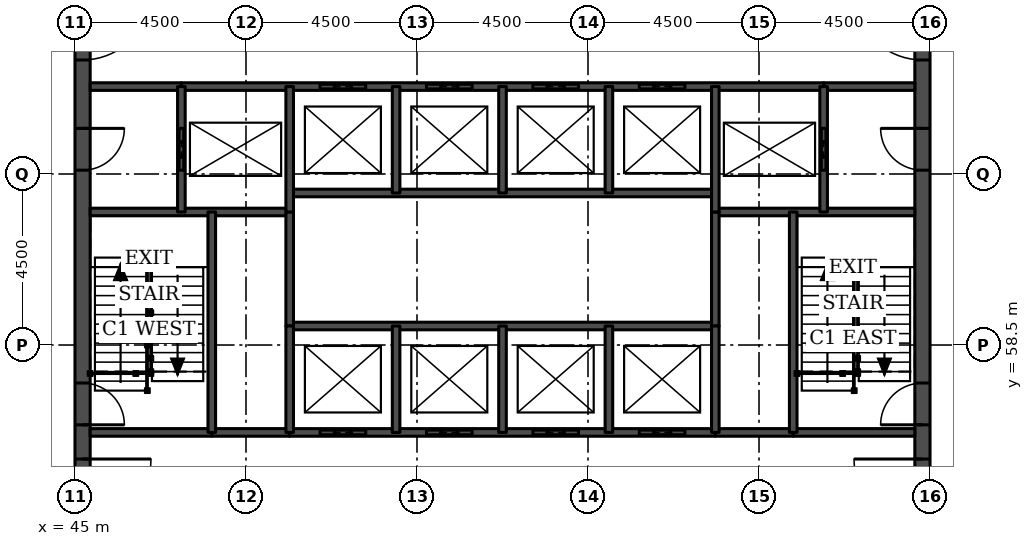
"""IFC4 building model, lengths in metres.
Left out: names, types, materials, properties, quantities, classifications, styles, units other than length and angle.
Written with IfcOpenShell. Run it as: python <this file> out.ifc"""

import sys

from ifc_helpers import new_model, si_unit, direction, frame, frame_2d, origin, place, context, subcontext, project, spatial, rectangle, extrude, element, fill, save


model = new_model("IFC4")
c1 = context("Model", 3, precision=1e-05, world=origin(), true_north=direction((0.0, 1.0)))
c2 = subcontext(c1, "Body", "Model", "MODEL_VIEW")
j1 = project(units=[si_unit("LENGTHUNIT", "METRE"), si_unit("PLANEANGLEUNIT", "RADIAN")], contexts=[c1])
p1 = place(None, origin())
s1 = spatial("IfcSite", under=j1, at=p1, CompositionType="ELEMENT")
p2 = place(p1, origin())
s2 = spatial("IfcBuilding", under=s1, at=p2, CompositionType="ELEMENT")
p3 = place(p2, frame((0.0, 0.0, 245.2)))
s3 = spatial("IfcBuildingStorey", under=s2, at=p3, CompositionType="ELEMENT", Elevation=245.2)
p4 = place(p3, frame((45.2, 49.5, 0.0), z_axis=(0.0, 0.0, 1.0), x_axis=(0.0, 1.0, 0.0)))
e1 = element("IfcWall", 1, at=p4, inside=s3, PredefinedType="SHEAR", context=c2, shape_type="SweptSolid", body=[
    extrude(rectangle(XDim=22.5, YDim=0.4, at=frame_2d((11.25, 0.0))), origin(), (0.0, 0.0, 1.0), 3.7),
])
p5 = place(p4, frame((4.2, 0.0, 0.0)))
e2 = element("IfcOpeningElement", 2, at=p5, cuts=e1, PredefinedType="OPENING", context=c2, shape_type="SweptSolid", body=[
    extrude(rectangle(XDim=1.8, YDim=2.1, at=frame_2d((0.9, 1.05))), frame((0.0, 0.21, 0.0), z_axis=(0.0, -1.0, 0.0), x_axis=(1.0, 0.0, 0.0)), (0.0, 0.0, 1.0), 0.42),
])
p6 = place(p4, frame((6.9, 0.0, 0.0)))
e3 = element("IfcOpeningElement", 3, at=p6, cuts=e1, PredefinedType="OPENING", context=c2, shape_type="SweptSolid", body=[
    extrude(rectangle(XDim=1.1, YDim=2.1, at=frame_2d((0.55, 1.05))), frame((0.0, 0.21, 0.0), z_axis=(0.0, -1.0, 0.0), x_axis=(1.0, 0.0, 0.0)), (0.0, 0.0, 1.0), 0.42),
])
p7 = place(p4, frame((13.6, 0.0, 0.0)))
e4 = element("IfcOpeningElement", 4, at=p7, cuts=e1, PredefinedType="OPENING", context=c2, shape_type="SweptSolid", body=[
    extrude(rectangle(XDim=1.1, YDim=2.1, at=frame_2d((0.55, 1.05))), frame((0.0, 0.21, 0.0), z_axis=(0.0, -1.0, 0.0), x_axis=(1.0, 0.0, 0.0)), (0.0, 0.0, 1.0), 0.42),
])
p8 = place(p4, frame((16.5, 0.0, 0.0)))
e5 = element("IfcOpeningElement", 5, at=p8, cuts=e1, PredefinedType="OPENING", context=c2, shape_type="SweptSolid", body=[
    extrude(rectangle(XDim=1.8, YDim=2.1, at=frame_2d((0.9, 1.05))), frame((0.0, 0.21, 0.0), z_axis=(0.0, -1.0, 0.0), x_axis=(1.0, 0.0, 0.0)), (0.0, 0.0, 1.0), 0.42),
])
p9 = place(p3, frame((67.3, 49.5, 0.0), z_axis=(0.0, 0.0, 1.0), x_axis=(0.0, 1.0, 0.0)))
e6 = element("IfcWall", 6, at=p9, inside=s3, PredefinedType="SHEAR", context=c2, shape_type="SweptSolid", body=[
    extrude(rectangle(XDim=22.5, YDim=0.4, at=frame_2d((11.25, 0.0))), origin(), (0.0, 0.0, 1.0), 3.7),
])
p10 = place(p9, frame((4.2, 0.0, 0.0)))
e7 = element("IfcOpeningElement", 7, at=p10, cuts=e6, PredefinedType="OPENING", context=c2, shape_type="SweptSolid", body=[
    extrude(rectangle(XDim=1.8, YDim=2.1, at=frame_2d((0.9, 1.05))), frame((0.0, 0.21, 0.0), z_axis=(0.0, -1.0, 0.0), x_axis=(1.0, 0.0, 0.0)), (0.0, 0.0, 1.0), 0.42),
])
p11 = place(p9, frame((6.9, 0.0, 0.0)))
e8 = element("IfcOpeningElement", 8, at=p11, cuts=e6, PredefinedType="OPENING", context=c2, shape_type="SweptSolid", body=[
    extrude(rectangle(XDim=1.1, YDim=2.1, at=frame_2d((0.55, 1.05))), frame((0.0, 0.21, 0.0), z_axis=(0.0, -1.0, 0.0), x_axis=(1.0, 0.0, 0.0)), (0.0, 0.0, 1.0), 0.42),
])
p12 = place(p9, frame((13.6, 0.0, 0.0)))
e9 = element("IfcOpeningElement", 9, at=p12, cuts=e6, PredefinedType="OPENING", context=c2, shape_type="SweptSolid", body=[
    extrude(rectangle(XDim=1.1, YDim=2.1, at=frame_2d((0.55, 1.05))), frame((0.0, 0.21, 0.0), z_axis=(0.0, -1.0, 0.0), x_axis=(1.0, 0.0, 0.0)), (0.0, 0.0, 1.0), 0.42),
])
p13 = place(p9, frame((16.5, 0.0, 0.0)))
e10 = element("IfcOpeningElement", 10, at=p13, cuts=e6, PredefinedType="OPENING", context=c2, shape_type="SweptSolid", body=[
    extrude(rectangle(XDim=1.8, YDim=2.1, at=frame_2d((0.9, 1.05))), frame((0.0, 0.21, 0.0), z_axis=(0.0, -1.0, 0.0), x_axis=(1.0, 0.0, 0.0)), (0.0, 0.0, 1.0), 0.42),
])
for number, where, z_axis, x_axis in (
    (11, (48.6, 56.2, 0.0), (0.0, 0.0, 1.0), (1.0, 0.0, 0.0)),
    (12, (61.85, 56.2, 0.0), (0.0, 0.0, 1.0), (1.0, 0.0, 0.0)),
):
    element("IfcWall", number, at=place(p3, frame(where, z_axis=z_axis, x_axis=x_axis)), inside=s3, PredefinedType="SOLIDWALL", context=c2, shape_type="SweptSolid", body=[
        extrude(rectangle(XDim=2.05, YDim=0.2, at=frame_2d((1.025, 0.0))), origin(), (0.0, 0.0, 1.0), 3.55),
    ])
p14 = place(p3, frame((45.4, 56.2, 0.0), z_axis=(0.0, 0.0, 1.0), x_axis=(1.0, 0.0, 0.0)))
e13 = element("IfcWall", 13, at=p14, inside=s3, PredefinedType="SOLIDWALL", context=c2, shape_type="SweptSolid", body=[
    extrude(rectangle(XDim=3.2, YDim=0.2, at=frame_2d((1.6, 0.0))), origin(), (0.0, 0.0, 1.0), 3.55),
])
p15 = place(p3, frame((50.65, 56.2, 0.0), z_axis=(0.0, 0.0, 1.0), x_axis=(1.0, 0.0, 0.0)))
e14 = element("IfcWall", 14, at=p15, inside=s3, PredefinedType="SOLIDWALL", context=c2, shape_type="SweptSolid", body=[
    extrude(rectangle(XDim=11.2, YDim=0.2, at=frame_2d((5.6, 0.0))), origin(), (0.0, 0.0, 1.0), 3.55),
])
p16 = place(p15, frame((0.8, 0.0, 0.0)))
e15 = element("IfcOpeningElement", 15, at=p16, cuts=e14, PredefinedType="OPENING", context=c2, shape_type="SweptSolid", body=[
    extrude(rectangle(XDim=1.2, YDim=2.1, at=frame_2d((0.6, 1.05))), frame((0.0, 0.11, 0.0), z_axis=(0.0, -1.0, 0.0), x_axis=(1.0, 0.0, 0.0)), (0.0, 0.0, 1.0), 0.22),
])
p17 = place(p15, frame((3.6, 0.0, 0.0)))
e16 = element("IfcOpeningElement", 16, at=p17, cuts=e14, PredefinedType="OPENING", context=c2, shape_type="SweptSolid", body=[
    extrude(rectangle(XDim=1.2, YDim=2.1, at=frame_2d((0.6, 1.05))), frame((0.0, 0.11, 0.0), z_axis=(0.0, -1.0, 0.0), x_axis=(1.0, 0.0, 0.0)), (0.0, 0.0, 1.0), 0.22),
])
p18 = place(p15, frame((6.4, 0.0, 0.0)))
e17 = element("IfcOpeningElement", 17, at=p18, cuts=e14, PredefinedType="OPENING", context=c2, shape_type="SweptSolid", body=[
    extrude(rectangle(XDim=1.2, YDim=2.1, at=frame_2d((0.6, 1.05))), frame((0.0, 0.11, 0.0), z_axis=(0.0, -1.0, 0.0), x_axis=(1.0, 0.0, 0.0)), (0.0, 0.0, 1.0), 0.22),
])
p19 = place(p15, frame((9.2, 0.0, 0.0)))
e18 = element("IfcOpeningElement", 18, at=p19, cuts=e14, PredefinedType="OPENING", context=c2, shape_type="SweptSolid", body=[
    extrude(rectangle(XDim=1.2, YDim=2.1, at=frame_2d((0.6, 1.05))), frame((0.0, 0.11, 0.0), z_axis=(0.0, -1.0, 0.0), x_axis=(1.0, 0.0, 0.0)), (0.0, 0.0, 1.0), 0.22),
])
p20 = place(p3, frame((63.9, 56.2, 0.0), z_axis=(0.0, 0.0, 1.0), x_axis=(1.0, 0.0, 0.0)))
e19 = element("IfcWall", 19, at=p20, inside=s3, PredefinedType="SOLIDWALL", context=c2, shape_type="SweptSolid", body=[
    extrude(rectangle(XDim=3.2, YDim=0.2, at=frame_2d((1.6, 0.0))), origin(), (0.0, 0.0, 1.0), 3.55),
])
p21 = place(p3, frame((50.65, 59.0, 0.0), z_axis=(0.0, 0.0, 1.0), x_axis=(1.0, 0.0, 0.0)))
e20 = element("IfcWall", 20, at=p21, inside=s3, PredefinedType="SOLIDWALL", context=c2, shape_type="SweptSolid", body=[
    extrude(rectangle(XDim=11.2, YDim=0.2, at=frame_2d((5.6, 0.0))), origin(), (0.0, 0.0, 1.0), 3.7),
])
for number, where, z_axis, x_axis in (
    (21, (45.4, 62.0, 0.0), (0.0, 0.0, 1.0), (1.0, 0.0, 0.0)),
    (22, (61.85, 62.0, 0.0), (0.0, 0.0, 1.0), (1.0, 0.0, 0.0)),
):
    element("IfcWall", number, at=place(p3, frame(where, z_axis=z_axis, x_axis=x_axis)), inside=s3, PredefinedType="SOLIDWALL", context=c2, shape_type="SweptSolid", body=[
        extrude(rectangle(XDim=5.25, YDim=0.2, at=frame_2d((2.625, 0.0))), origin(), (0.0, 0.0, 1.0), 3.55),
    ])
p22 = place(p3, frame((50.65, 62.5, 0.0), z_axis=(0.0, 0.0, 1.0), x_axis=(1.0, 0.0, 0.0)))
e23 = element("IfcWall", 23, at=p22, inside=s3, PredefinedType="SOLIDWALL", context=c2, shape_type="SweptSolid", body=[
    extrude(rectangle(XDim=11.2, YDim=0.2, at=frame_2d((5.6, 0.0))), origin(), (0.0, 0.0, 1.0), 3.7),
])
for number, where, z_axis, x_axis in (
    (24, (45.4, 65.3, 0.0), (0.0, 0.0, 1.0), (1.0, 0.0, 0.0)),
    (25, (64.7, 65.3, 0.0), (0.0, 0.0, 1.0), (1.0, 0.0, 0.0)),
):
    element("IfcWall", number, at=place(p3, frame(where, z_axis=z_axis, x_axis=x_axis)), inside=s3, PredefinedType="SOLIDWALL", context=c2, shape_type="SweptSolid", body=[
        extrude(rectangle(XDim=2.4, YDim=0.2, at=frame_2d((1.2, 0.0))), origin(), (0.0, 0.0, 1.0), 3.55),
    ])
p23 = place(p3, frame((47.8, 65.3, 0.0), z_axis=(0.0, 0.0, 1.0), x_axis=(1.0, 0.0, 0.0)))
e26 = element("IfcWall", 26, at=p23, inside=s3, PredefinedType="SOLIDWALL", context=c2, shape_type="SweptSolid", body=[
    extrude(rectangle(XDim=16.9, YDim=0.2, at=frame_2d((8.45, 0.0))), origin(), (0.0, 0.0, 1.0), 3.55),
])
p24 = place(p23, frame((3.65, 0.0, 0.0)))
e27 = element("IfcOpeningElement", 27, at=p24, cuts=e26, PredefinedType="OPENING", context=c2, shape_type="SweptSolid", body=[
    extrude(rectangle(XDim=1.2, YDim=2.1, at=frame_2d((0.6, 1.05))), frame((0.0, 0.11, 0.0), z_axis=(0.0, -1.0, 0.0), x_axis=(1.0, 0.0, 0.0)), (0.0, 0.0, 1.0), 0.22),
])
p25 = place(p23, frame((6.45, 0.0, 0.0)))
e28 = element("IfcOpeningElement", 28, at=p25, cuts=e26, PredefinedType="OPENING", context=c2, shape_type="SweptSolid", body=[
    extrude(rectangle(XDim=1.2, YDim=2.1, at=frame_2d((0.6, 1.05))), frame((0.0, 0.11, 0.0), z_axis=(0.0, -1.0, 0.0), x_axis=(1.0, 0.0, 0.0)), (0.0, 0.0, 1.0), 0.22),
])
p26 = place(p23, frame((9.25, 0.0, 0.0)))
e29 = element("IfcOpeningElement", 29, at=p26, cuts=e26, PredefinedType="OPENING", context=c2, shape_type="SweptSolid", body=[
    extrude(rectangle(XDim=1.2, YDim=2.1, at=frame_2d((0.6, 1.05))), frame((0.0, 0.11, 0.0), z_axis=(0.0, -1.0, 0.0), x_axis=(1.0, 0.0, 0.0)), (0.0, 0.0, 1.0), 0.22),
])
p27 = place(p23, frame((12.05, 0.0, 0.0)))
e30 = element("IfcOpeningElement", 30, at=p27, cuts=e26, PredefinedType="OPENING", context=c2, shape_type="SweptSolid", body=[
    extrude(rectangle(XDim=1.2, YDim=2.1, at=frame_2d((0.6, 1.05))), frame((0.0, 0.11, 0.0), z_axis=(0.0, -1.0, 0.0), x_axis=(1.0, 0.0, 0.0)), (0.0, 0.0, 1.0), 0.22),
])
p28 = place(p3, frame((47.8, 62.0, 0.0), z_axis=(0.0, 0.0, 1.0), x_axis=(0.0, 1.0, 0.0)))
e31 = element("IfcWall", 31, at=p28, inside=s3, PredefinedType="SOLIDWALL", context=c2, shape_type="SweptSolid", body=[
    extrude(rectangle(XDim=3.3, YDim=0.2, at=frame_2d((1.65, 0.0))), origin(), (0.0, 0.0, 1.0), 3.55),
])
p29 = place(p28, frame((1.1, 0.0, 0.0)))
e32 = element("IfcOpeningElement", 32, at=p29, cuts=e31, PredefinedType="OPENING", context=c2, shape_type="SweptSolid", body=[
    extrude(rectangle(XDim=1.1, YDim=2.1, at=frame_2d((0.55, 1.05))), frame((0.0, 0.11, 0.0), z_axis=(0.0, -1.0, 0.0), x_axis=(1.0, 0.0, 0.0)), (0.0, 0.0, 1.0), 0.22),
])
p30 = place(p3, frame((48.6, 56.2, 0.0), z_axis=(0.0, 0.0, 1.0), x_axis=(0.0, 1.0, 0.0)))
e33 = element("IfcWall", 33, at=p30, inside=s3, PredefinedType="SOLIDWALL", context=c2, shape_type="SweptSolid", body=[
    extrude(rectangle(XDim=5.8, YDim=0.2, at=frame_2d((2.9, 0.0))), origin(), (0.0, 0.0, 1.0), 3.55),
])
p31 = place(p3, frame((50.65, 59.0, 0.0), z_axis=(0.0, 0.0, 1.0), x_axis=(0.0, 1.0, 0.0)))
e34 = element("IfcWall", 34, at=p31, inside=s3, PredefinedType="SOLIDWALL", context=c2, shape_type="SweptSolid", body=[
    extrude(rectangle(XDim=3.0, YDim=0.2, at=frame_2d((1.5, 0.0))), origin(), (0.0, 0.0, 1.0), 3.7),
])
p32 = place(p3, frame((50.65, 56.2, 0.0), z_axis=(0.0, 0.0, 1.0), x_axis=(0.0, 1.0, 0.0)))
e35 = element("IfcWall", 35, at=p32, inside=s3, PredefinedType="SOLIDWALL", context=c2, shape_type="SweptSolid", body=[
    extrude(rectangle(XDim=2.8, YDim=0.2, at=frame_2d((1.4, 0.0))), origin(), (0.0, 0.0, 1.0), 3.55),
])
p33 = place(p3, frame((50.65, 62.0, 0.0), z_axis=(0.0, 0.0, 1.0), x_axis=(0.0, 1.0, 0.0)))
e36 = element("IfcWall", 36, at=p33, inside=s3, PredefinedType="SOLIDWALL", context=c2, shape_type="SweptSolid", body=[
    extrude(rectangle(XDim=3.3, YDim=0.2, at=frame_2d((1.65, 0.0))), origin(), (0.0, 0.0, 1.0), 3.55),
])
for number, where, z_axis, x_axis in (
    (37, (53.45, 56.2, 0.0), (0.0, 0.0, 1.0), (0.0, 1.0, 0.0)),
    (38, (53.45, 62.5, 0.0), (0.0, 0.0, 1.0), (0.0, 1.0, 0.0)),
    (39, (56.25, 56.2, 0.0), (0.0, 0.0, 1.0), (0.0, 1.0, 0.0)),
    (40, (56.25, 62.5, 0.0), (0.0, 0.0, 1.0), (0.0, 1.0, 0.0)),
    (41, (59.05, 56.2, 0.0), (0.0, 0.0, 1.0), (0.0, 1.0, 0.0)),
    (42, (59.05, 62.5, 0.0), (0.0, 0.0, 1.0), (0.0, 1.0, 0.0)),
):
    element("IfcWall", number, at=place(p3, frame(where, z_axis=z_axis, x_axis=x_axis)), inside=s3, PredefinedType="SOLIDWALL", context=c2, shape_type="SweptSolid", body=[
        extrude(rectangle(XDim=2.8, YDim=0.2, at=frame_2d((1.4, 0.0))), origin(), (0.0, 0.0, 1.0), 3.55),
    ])
p34 = place(p3, frame((61.85, 59.0, 0.0), z_axis=(0.0, 0.0, 1.0), x_axis=(0.0, 1.0, 0.0)))
e43 = element("IfcWall", 43, at=p34, inside=s3, PredefinedType="SOLIDWALL", context=c2, shape_type="SweptSolid", body=[
    extrude(rectangle(XDim=3.0, YDim=0.2, at=frame_2d((1.5, 0.0))), origin(), (0.0, 0.0, 1.0), 3.7),
])
p35 = place(p3, frame((61.85, 56.2, 0.0), z_axis=(0.0, 0.0, 1.0), x_axis=(0.0, 1.0, 0.0)))
e44 = element("IfcWall", 44, at=p35, inside=s3, PredefinedType="SOLIDWALL", context=c2, shape_type="SweptSolid", body=[
    extrude(rectangle(XDim=2.8, YDim=0.2, at=frame_2d((1.4, 0.0))), origin(), (0.0, 0.0, 1.0), 3.55),
])
p36 = place(p3, frame((61.85, 62.0, 0.0), z_axis=(0.0, 0.0, 1.0), x_axis=(0.0, 1.0, 0.0)))
e45 = element("IfcWall", 45, at=p36, inside=s3, PredefinedType="SOLIDWALL", context=c2, shape_type="SweptSolid", body=[
    extrude(rectangle(XDim=3.3, YDim=0.2, at=frame_2d((1.65, 0.0))), origin(), (0.0, 0.0, 1.0), 3.55),
])
p37 = place(p3, frame((63.9, 56.2, 0.0), z_axis=(0.0, 0.0, 1.0), x_axis=(0.0, 1.0, 0.0)))
e46 = element("IfcWall", 46, at=p37, inside=s3, PredefinedType="SOLIDWALL", context=c2, shape_type="SweptSolid", body=[
    extrude(rectangle(XDim=5.8, YDim=0.2, at=frame_2d((2.9, 0.0))), origin(), (0.0, 0.0, 1.0), 3.55),
])
p38 = place(p3, frame((64.7, 62.0, 0.0), z_axis=(0.0, 0.0, 1.0), x_axis=(0.0, 1.0, 0.0)))
e47 = element("IfcWall", 47, at=p38, inside=s3, PredefinedType="SOLIDWALL", context=c2, shape_type="SweptSolid", body=[
    extrude(rectangle(XDim=3.3, YDim=0.2, at=frame_2d((1.65, 0.0))), origin(), (0.0, 0.0, 1.0), 3.55),
])
p39 = place(p38, frame((1.1, 0.0, 0.0)))
e48 = element("IfcOpeningElement", 48, at=p39, cuts=e47, PredefinedType="OPENING", context=c2, shape_type="SweptSolid", body=[
    extrude(rectangle(XDim=1.1, YDim=2.1, at=frame_2d((0.55, 1.05))), frame((0.0, 0.11, 0.0), z_axis=(0.0, -1.0, 0.0), x_axis=(1.0, 0.0, 0.0)), (0.0, 0.0, 1.0), 0.22),
])
p40 = place(p16, origin())
e49 = element("IfcDoor", 49, at=p40, inside=s3, OperationType="DOUBLE_DOOR_SLIDING", PredefinedType="DOOR", context=c2, shape_type="SweptSolid", body=[
    extrude(rectangle(XDim=1.2, YDim=2.1, at=frame_2d((0.6, 1.05))), frame((0.0, 0.025, 0.0), z_axis=(0.0, -1.0, 0.0), x_axis=(1.0, 0.0, 0.0)), (0.0, 0.0, 1.0), 0.05),
])
fill(e15, e49)
p41 = place(p17, origin())
e50 = element("IfcDoor", 50, at=p41, inside=s3, OperationType="DOUBLE_DOOR_SLIDING", PredefinedType="DOOR", context=c2, shape_type="SweptSolid", body=[
    extrude(rectangle(XDim=1.2, YDim=2.1, at=frame_2d((0.6, 1.05))), frame((0.0, 0.025, 0.0), z_axis=(0.0, -1.0, 0.0), x_axis=(1.0, 0.0, 0.0)), (0.0, 0.0, 1.0), 0.05),
])
fill(e16, e50)
p42 = place(p18, origin())
e51 = element("IfcDoor", 51, at=p42, inside=s3, OperationType="DOUBLE_DOOR_SLIDING", PredefinedType="DOOR", context=c2, shape_type="SweptSolid", body=[
    extrude(rectangle(XDim=1.2, YDim=2.1, at=frame_2d((0.6, 1.05))), frame((0.0, 0.025, 0.0), z_axis=(0.0, -1.0, 0.0), x_axis=(1.0, 0.0, 0.0)), (0.0, 0.0, 1.0), 0.05),
])
fill(e17, e51)
p43 = place(p19, origin())
e52 = element("IfcDoor", 52, at=p43, inside=s3, OperationType="DOUBLE_DOOR_SLIDING", PredefinedType="DOOR", context=c2, shape_type="SweptSolid", body=[
    extrude(rectangle(XDim=1.2, YDim=2.1, at=frame_2d((0.6, 1.05))), frame((0.0, 0.025, 0.0), z_axis=(0.0, -1.0, 0.0), x_axis=(1.0, 0.0, 0.0)), (0.0, 0.0, 1.0), 0.05),
])
fill(e18, e52)
p44 = place(p24, origin())
e53 = element("IfcDoor", 53, at=p44, inside=s3, OperationType="DOUBLE_DOOR_SLIDING", PredefinedType="DOOR", context=c2, shape_type="SweptSolid", body=[
    extrude(rectangle(XDim=1.2, YDim=2.1, at=frame_2d((0.6, 1.05))), frame((0.0, 0.025, 0.0), z_axis=(0.0, -1.0, 0.0), x_axis=(1.0, 0.0, 0.0)), (0.0, 0.0, 1.0), 0.05),
])
fill(e27, e53)
p45 = place(p25, origin())
e54 = element("IfcDoor", 54, at=p45, inside=s3, OperationType="DOUBLE_DOOR_SLIDING", PredefinedType="DOOR", context=c2, shape_type="SweptSolid", body=[
    extrude(rectangle(XDim=1.2, YDim=2.1, at=frame_2d((0.6, 1.05))), frame((0.0, 0.025, 0.0), z_axis=(0.0, -1.0, 0.0), x_axis=(1.0, 0.0, 0.0)), (0.0, 0.0, 1.0), 0.05),
])
fill(e28, e54)
p46 = place(p26, origin())
e55 = element("IfcDoor", 55, at=p46, inside=s3, OperationType="DOUBLE_DOOR_SLIDING", PredefinedType="DOOR", context=c2, shape_type="SweptSolid", body=[
    extrude(rectangle(XDim=1.2, YDim=2.1, at=frame_2d((0.6, 1.05))), frame((0.0, 0.025, 0.0), z_axis=(0.0, -1.0, 0.0), x_axis=(1.0, 0.0, 0.0)), (0.0, 0.0, 1.0), 0.05),
])
fill(e29, e55)
p47 = place(p27, origin())
e56 = element("IfcDoor", 56, at=p47, inside=s3, OperationType="DOUBLE_DOOR_SLIDING", PredefinedType="DOOR", context=c2, shape_type="SweptSolid", body=[
    extrude(rectangle(XDim=1.2, YDim=2.1, at=frame_2d((0.6, 1.05))), frame((0.0, 0.025, 0.0), z_axis=(0.0, -1.0, 0.0), x_axis=(1.0, 0.0, 0.0)), (0.0, 0.0, 1.0), 0.05),
])
fill(e30, e56)
p48 = place(p29, origin())
e57 = element("IfcDoor", 57, at=p48, inside=s3, OperationType="DOUBLE_DOOR_SLIDING", PredefinedType="DOOR", context=c2, shape_type="SweptSolid", body=[
    extrude(rectangle(XDim=1.1, YDim=2.1, at=frame_2d((0.55, 1.05))), frame((0.0, 0.025, 0.0), z_axis=(0.0, -1.0, 0.0), x_axis=(1.0, 0.0, 0.0)), (0.0, 0.0, 1.0), 0.05),
])
fill(e32, e57)
p49 = place(p39, origin())
e58 = element("IfcDoor", 58, at=p49, inside=s3, OperationType="DOUBLE_DOOR_SLIDING", PredefinedType="DOOR", context=c2, shape_type="SweptSolid", body=[
    extrude(rectangle(XDim=1.1, YDim=2.1, at=frame_2d((0.55, 1.05))), frame((0.0, 0.025, 0.0), z_axis=(0.0, -1.0, 0.0), x_axis=(1.0, 0.0, 0.0)), (0.0, 0.0, 1.0), 0.05),
])
fill(e48, e58)
p50 = place(p5, frame((1.8, 0.0, 0.0), z_axis=(0.0, 0.0, 1.0), x_axis=(-1.0, 0.0, 0.0)))
e59 = element("IfcDoor", 59, at=p50, inside=s3, OperationType="SINGLE_SWING_LEFT", PredefinedType="DOOR", context=c2, shape_type="SweptSolid", body=[
    extrude(rectangle(XDim=1.8, YDim=2.1, at=frame_2d((0.9, 1.05))), frame((0.0, 0.025, 0.0), z_axis=(0.0, -1.0, 0.0), x_axis=(1.0, 0.0, 0.0)), (0.0, 0.0, 1.0), 0.05),
])
fill(e2, e59)
p51 = place(p6, frame((1.1, 0.0, 0.0), z_axis=(0.0, 0.0, 1.0), x_axis=(-1.0, 0.0, 0.0)))
e60 = element("IfcDoor", 60, at=p51, inside=s3, OperationType="SINGLE_SWING_RIGHT", PredefinedType="DOOR", context=c2, shape_type="SweptSolid", body=[
    extrude(rectangle(XDim=1.1, YDim=2.1, at=frame_2d((0.55, 1.05))), frame((0.0, 0.025, 0.0), z_axis=(0.0, -1.0, 0.0), x_axis=(1.0, 0.0, 0.0)), (0.0, 0.0, 1.0), 0.05),
])
fill(e3, e60)
p52 = place(p7, frame((1.1, 0.0, 0.0), z_axis=(0.0, 0.0, 1.0), x_axis=(-1.0, 0.0, 0.0)))
e61 = element("IfcDoor", 61, at=p52, inside=s3, OperationType="SINGLE_SWING_LEFT", PredefinedType="DOOR", context=c2, shape_type="SweptSolid", body=[
    extrude(rectangle(XDim=1.1, YDim=2.1, at=frame_2d((0.55, 1.05))), frame((0.0, 0.025, 0.0), z_axis=(0.0, -1.0, 0.0), x_axis=(1.0, 0.0, 0.0)), (0.0, 0.0, 1.0), 0.05),
])
fill(e4, e61)
p53 = place(p8, frame((1.8, 0.0, 0.0), z_axis=(0.0, 0.0, 1.0), x_axis=(-1.0, 0.0, 0.0)))
e62 = element("IfcDoor", 62, at=p53, inside=s3, OperationType="SINGLE_SWING_LEFT", PredefinedType="DOOR", context=c2, shape_type="SweptSolid", body=[
    extrude(rectangle(XDim=1.8, YDim=2.1, at=frame_2d((0.9, 1.05))), frame((0.0, 0.025, 0.0), z_axis=(0.0, -1.0, 0.0), x_axis=(1.0, 0.0, 0.0)), (0.0, 0.0, 1.0), 0.05),
])
fill(e5, e62)
p54 = place(p10, origin())
e63 = element("IfcDoor", 63, at=p54, inside=s3, OperationType="SINGLE_SWING_RIGHT", PredefinedType="DOOR", context=c2, shape_type="SweptSolid", body=[
    extrude(rectangle(XDim=1.8, YDim=2.1, at=frame_2d((0.9, 1.05))), frame((0.0, 0.025, 0.0), z_axis=(0.0, -1.0, 0.0), x_axis=(1.0, 0.0, 0.0)), (0.0, 0.0, 1.0), 0.05),
])
fill(e7, e63)
p55 = place(p11, origin())
e64 = element("IfcDoor", 64, at=p55, inside=s3, OperationType="SINGLE_SWING_LEFT", PredefinedType="DOOR", context=c2, shape_type="SweptSolid", body=[
    extrude(rectangle(XDim=1.1, YDim=2.1, at=frame_2d((0.55, 1.05))), frame((0.0, 0.025, 0.0), z_axis=(0.0, -1.0, 0.0), x_axis=(1.0, 0.0, 0.0)), (0.0, 0.0, 1.0), 0.05),
])
fill(e8, e64)
p56 = place(p12, origin())
e65 = element("IfcDoor", 65, at=p56, inside=s3, OperationType="SINGLE_SWING_RIGHT", PredefinedType="DOOR", context=c2, shape_type="SweptSolid", body=[
    extrude(rectangle(XDim=1.1, YDim=2.1, at=frame_2d((0.55, 1.05))), frame((0.0, 0.025, 0.0), z_axis=(0.0, -1.0, 0.0), x_axis=(1.0, 0.0, 0.0)), (0.0, 0.0, 1.0), 0.05),
])
fill(e9, e65)
p57 = place(p13, origin())
e66 = element("IfcDoor", 66, at=p57, inside=s3, OperationType="SINGLE_SWING_RIGHT", PredefinedType="DOOR", context=c2, shape_type="SweptSolid", body=[
    extrude(rectangle(XDim=1.8, YDim=2.1, at=frame_2d((0.9, 1.05))), frame((0.0, 0.025, 0.0), z_axis=(0.0, -1.0, 0.0), x_axis=(1.0, 0.0, 0.0)), (0.0, 0.0, 1.0), 0.05),
])
fill(e10, e66)
save(model, sys.argv[1])
